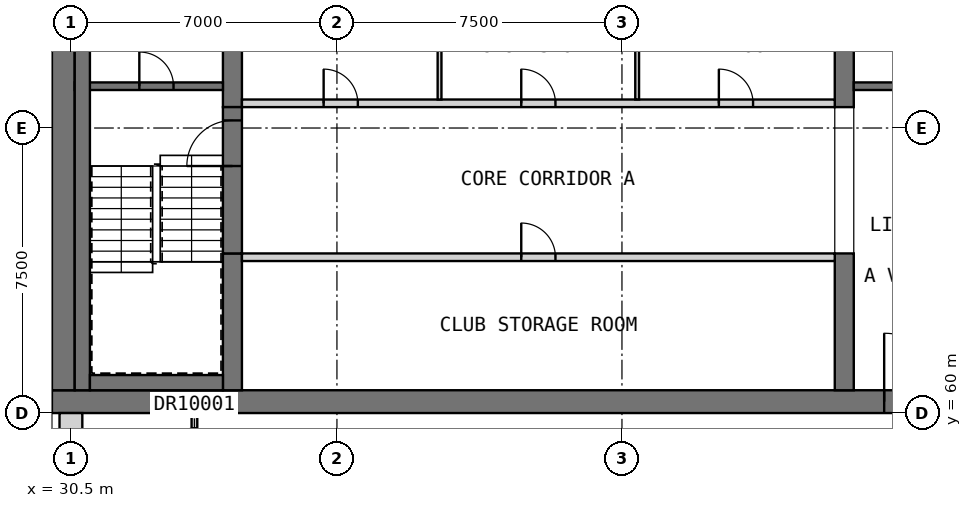
"""IFC4 building model, lengths in metres.
Left out: names, types, materials, properties, quantities, classifications, styles, units other than length and angle.
Written with IfcOpenShell. Run it as: python <this file> out.ifc"""

import sys

from ifc_helpers import new_model, si_unit, direction, frame, frame_2d, origin, place, context, subcontext, project, spatial, rectangle, extrude, element, fill, save


model = new_model("IFC4")
c1 = context("Model", 3, precision=1e-05, world=origin(), true_north=direction((0.0, 1.0)))
c2 = subcontext(c1, "Body", "Model", "MODEL_VIEW")
j1 = project(units=[si_unit("LENGTHUNIT", "METRE"), si_unit("PLANEANGLEUNIT", "RADIAN")], contexts=[c1])
p1 = place(None, origin())
s1 = spatial("IfcSite", under=j1, at=p1, CompositionType="ELEMENT")
p2 = place(p1, origin())
s2 = spatial("IfcBuilding", under=s1, at=p2, CompositionType="ELEMENT")
p3 = place(p2, frame((0.0, 0.0, 273.2)))
s3 = spatial("IfcBuildingStorey", under=s2, at=p3, CompositionType="ELEMENT", Elevation=273.2)
p4 = place(p3, frame((30.0, 60.3, 0.0), z_axis=(0.0, 0.0, 1.0), x_axis=(1.0, 0.0, 0.0)))
e1 = element("IfcWall", 1, at=p4, inside=s3, PredefinedType="SHEAR", context=c2, shape_type="SweptSolid", body=[
    extrude(rectangle(XDim=30.0, YDim=0.6, at=frame_2d((15.0, 0.0))), origin(), (0.0, 0.0, 1.0), 3.5),
])
p5 = place(p4, frame((21.9, 0.0, 0.0)))
e2 = element("IfcOpeningElement", 2, at=p5, cuts=e1, PredefinedType="OPENING", context=c2, shape_type="SweptSolid", body=[
    extrude(rectangle(XDim=1.8, YDim=2.1, at=frame_2d((0.9, 1.05))), frame((0.0, 0.31, 0.0), z_axis=(0.0, -1.0, 0.0), x_axis=(1.0, 0.0, 0.0)), (0.0, 0.0, 1.0), 0.62),
])
p6 = place(p4, frame((26.5, 0.0, 0.0)))
e3 = element("IfcOpeningElement", 3, at=p6, cuts=e1, PredefinedType="OPENING", context=c2, shape_type="SweptSolid", body=[
    extrude(rectangle(XDim=1.2, YDim=2.1, at=frame_2d((0.6, 1.05))), frame((0.0, 0.31, 0.0), z_axis=(0.0, -1.0, 0.0), x_axis=(1.0, 0.0, 0.0)), (0.0, 0.0, 1.0), 0.62),
])
p7 = place(p3, frame((30.3, 60.6, 0.0), z_axis=(0.0, 0.0, 1.0), x_axis=(0.0, 1.0, 0.0)))
e4 = element("IfcWall", 4, at=p7, inside=s3, PredefinedType="SHEAR", context=c2, shape_type="SweptSolid", body=[
    extrude(rectangle(XDim=21.3, YDim=0.6, at=frame_2d((10.65, 0.0))), origin(), (0.0, 0.0, 1.0), 3.5),
])
p8 = place(p3, frame((34.75, 60.6, 0.0), z_axis=(0.0, 0.0, 1.0), x_axis=(0.0, 1.0, 0.0)))
e5 = element("IfcWall", 5, at=p8, inside=s3, PredefinedType="SHEAR", context=c2, shape_type="SweptSolid", body=[
    extrude(rectangle(XDim=3.6, YDim=0.5, at=frame_2d((1.8, 0.0))), origin(), (0.0, 0.0, 1.0), 3.5),
])
p9 = place(p3, frame((34.75, 68.05, 0.0), z_axis=(0.0, 0.0, 1.0), x_axis=(0.0, 1.0, 0.0)))
e6 = element("IfcWall", 6, at=p9, inside=s3, PredefinedType="SHEAR", context=c2, shape_type="SweptSolid", body=[
    extrude(rectangle(XDim=6.4, YDim=0.5, at=frame_2d((3.2, 0.0))), origin(), (0.0, 0.0, 1.0), 3.5),
])
p10 = place(p3, frame((50.85, 60.6, 0.0), z_axis=(0.0, 0.0, 1.0), x_axis=(0.0, 1.0, 0.0)))
e7 = element("IfcWall", 7, at=p10, inside=s3, PredefinedType="SHEAR", context=c2, shape_type="SweptSolid", body=[
    extrude(rectangle(XDim=3.6, YDim=0.5, at=frame_2d((1.8, 0.0))), origin(), (0.0, 0.0, 1.0), 3.5),
])
p11 = place(p3, frame((50.85, 68.05, 0.0), z_axis=(0.0, 0.0, 1.0), x_axis=(0.0, 1.0, 0.0)))
e8 = element("IfcWall", 8, at=p11, inside=s3, PredefinedType="SHEAR", context=c2, shape_type="SweptSolid", body=[
    extrude(rectangle(XDim=6.4, YDim=0.5, at=frame_2d((3.2, 0.0))), origin(), (0.0, 0.0, 1.0), 3.5),
])
p12 = place(p3, frame((30.5, 60.0, 0.0), z_axis=(0.0, 0.0, 1.0), x_axis=(0.0, -1.0, 0.0)))
e9 = element("IfcWall", 9, at=p12, inside=s3, PredefinedType="SOLIDWALL", context=c2, shape_type="SweptSolid", body=[
    extrude(rectangle(XDim=7.0, YDim=0.6, at=frame_2d((3.5, 0.0))), origin(), (0.0, 0.0, 1.0), 3.25),
])
p13 = place(p12, frame((4.175, 0.0, 0.8)))
e10 = element("IfcOpeningElement", 10, at=p13, cuts=e9, PredefinedType="OPENING", context=c2, shape_type="SweptSolid", body=[
    extrude(rectangle(XDim=2.4, YDim=1.8, at=frame_2d((1.2, 0.9))), frame((0.0, 0.31, 0.0), z_axis=(0.0, -1.0, 0.0), x_axis=(1.0, 0.0, 0.0)), (0.0, 0.0, 1.0), 0.62),
])
p14 = place(p12, frame((0.675, 0.0, 0.8)))
e11 = element("IfcOpeningElement", 11, at=p14, cuts=e9, PredefinedType="OPENING", context=c2, shape_type="SweptSolid", body=[
    extrude(rectangle(XDim=2.4, YDim=1.8, at=frame_2d((1.2, 0.9))), frame((0.0, 0.31, 0.0), z_axis=(0.0, -1.0, 0.0), x_axis=(1.0, 0.0, 0.0)), (0.0, 0.0, 1.0), 0.62),
])
p15 = place(p3, frame((35.0, 64.1, 0.0), z_axis=(0.0, 0.0, 1.0), x_axis=(1.0, 0.0, 0.0)))
e12 = element("IfcWall", 12, at=p15, inside=s3, PredefinedType="PARTITIONING", context=c2, shape_type="SweptSolid", body=[
    extrude(rectangle(XDim=15.6, YDim=0.2, at=frame_2d((7.8, 0.0))), origin(), (0.0, 0.0, 1.0), 3.25),
])
p16 = place(p15, frame((7.35, 0.0, 0.0)))
e13 = element("IfcOpeningElement", 13, at=p16, cuts=e12, PredefinedType="OPENING", context=c2, shape_type="SweptSolid", body=[
    extrude(rectangle(XDim=0.9, YDim=2.1, at=frame_2d((0.45, 1.05))), frame((0.0, 0.11, 0.0), z_axis=(0.0, -1.0, 0.0), x_axis=(1.0, 0.0, 0.0)), (0.0, 0.0, 1.0), 0.22),
])
p17 = place(p3, frame((35.0, 68.15, 0.0), z_axis=(0.0, 0.0, 1.0), x_axis=(1.0, 0.0, 0.0)))
e14 = element("IfcWall", 14, at=p17, inside=s3, PredefinedType="PARTITIONING", context=c2, shape_type="SweptSolid", body=[
    extrude(rectangle(XDim=15.6, YDim=0.2, at=frame_2d((7.8, 0.0))), origin(), (0.0, 0.0, 1.0), 3.25),
])
p18 = place(p17, frame((2.15, 0.0, 0.0)))
e15 = element("IfcOpeningElement", 15, at=p18, cuts=e14, PredefinedType="OPENING", context=c2, shape_type="SweptSolid", body=[
    extrude(rectangle(XDim=0.9, YDim=2.1, at=frame_2d((0.45, 1.05))), frame((0.0, 0.11, 0.0), z_axis=(0.0, -1.0, 0.0), x_axis=(1.0, 0.0, 0.0)), (0.0, 0.0, 1.0), 0.22),
])
p19 = place(p17, frame((7.35, 0.0, 0.0)))
e16 = element("IfcOpeningElement", 16, at=p19, cuts=e14, PredefinedType="OPENING", context=c2, shape_type="SweptSolid", body=[
    extrude(rectangle(XDim=0.9, YDim=2.1, at=frame_2d((0.45, 1.05))), frame((0.0, 0.11, 0.0), z_axis=(0.0, -1.0, 0.0), x_axis=(1.0, 0.0, 0.0)), (0.0, 0.0, 1.0), 0.22),
])
p20 = place(p17, frame((12.55, 0.0, 0.0)))
e17 = element("IfcOpeningElement", 17, at=p20, cuts=e14, PredefinedType="OPENING", context=c2, shape_type="SweptSolid", body=[
    extrude(rectangle(XDim=0.9, YDim=2.1, at=frame_2d((0.45, 1.05))), frame((0.0, 0.11, 0.0), z_axis=(0.0, -1.0, 0.0), x_axis=(1.0, 0.0, 0.0)), (0.0, 0.0, 1.0), 0.22),
])
for number, where, z_axis, x_axis in (
    (18, (40.2, 68.25, 0.0), (0.0, 0.0, 1.0), (0.0, 1.0, 0.0)),
    (19, (45.4, 68.25, 0.0), (0.0, 0.0, 1.0), (0.0, 1.0, 0.0)),
):
    element("IfcWall", number, at=place(p3, frame(where, z_axis=z_axis, x_axis=x_axis)), inside=s3, PredefinedType="PARTITIONING", context=c2, shape_type="SweptSolid", body=[
        extrude(rectangle(XDim=2.75, YDim=0.1, at=frame_2d((1.375, 0.0))), origin(), (0.0, 0.0, 1.0), 3.25),
    ])
p21 = place(p3, frame((34.75, 64.2, 0.0), z_axis=(0.0, 0.0, 1.0), x_axis=(0.0, 1.0, 0.0)))
e20 = element("IfcWall", 20, at=p21, inside=s3, PredefinedType="SOLIDWALL", context=c2, shape_type="SweptSolid", body=[
    extrude(rectangle(XDim=3.85, YDim=0.5, at=frame_2d((1.925, 0.0))), origin(), (0.0, 0.0, 1.0), 2.3),
])
p22 = place(p21, frame((2.3, 0.0, 0.0)))
e21 = element("IfcOpeningElement", 21, at=p22, cuts=e20, PredefinedType="OPENING", context=c2, shape_type="SweptSolid", body=[
    extrude(rectangle(XDim=1.2, YDim=2.1, at=frame_2d((0.6, 1.05))), frame((0.0, 0.26, 0.0), z_axis=(0.0, -1.0, 0.0), x_axis=(1.0, 0.0, 0.0)), (0.0, 0.0, 1.0), 0.52),
])
p23 = place(p3, frame((30.6, 68.6, 0.0), z_axis=(0.0, 0.0, 1.0), x_axis=(1.0, 0.0, 0.0)))
e22 = element("IfcWall", 22, at=p23, inside=s3, PredefinedType="SOLIDWALL", context=c2, shape_type="SweptSolid", body=[
    extrude(rectangle(XDim=3.9, YDim=0.2, at=frame_2d((1.95, 0.0))), origin(), (0.0, 0.0, 1.0), 3.25),
])
p24 = place(p23, frame((1.7, 0.0, 0.0)))
e23 = element("IfcOpeningElement", 23, at=p24, cuts=e22, PredefinedType="OPENING", context=c2, shape_type="SweptSolid", body=[
    extrude(rectangle(XDim=0.9, YDim=2.1, at=frame_2d((0.45, 1.05))), frame((0.0, 0.11, 0.0), z_axis=(0.0, -1.0, 0.0), x_axis=(1.0, 0.0, 0.0)), (0.0, 0.0, 1.0), 0.22),
])
p25 = place(p3, frame((51.1, 68.6, 0.0), z_axis=(0.0, 0.0, 1.0), x_axis=(1.0, 0.0, 0.0)))
e24 = element("IfcWall", 24, at=p25, inside=s3, PredefinedType="SOLIDWALL", context=c2, shape_type="SweptSolid", body=[
    extrude(rectangle(XDim=8.3, YDim=0.2, at=frame_2d((4.15, 0.0))), origin(), (0.0, 0.0, 1.0), 3.25),
])
p26 = place(p3, frame((30.8, 60.6, 0.0), z_axis=(0.0, 0.0, 1.0), x_axis=(0.0, 1.0, 0.0)))
e25 = element("IfcWall", 25, at=p26, inside=s3, PredefinedType="SOLIDWALL", context=c2, shape_type="SweptSolid", body=[
    extrude(rectangle(XDim=21.3, YDim=0.4, at=frame_2d((10.65, 0.0))), origin(), (0.0, 0.0, 1.0), 3.25),
])
p27 = place(p3, frame((31.0, 60.8, 0.0), z_axis=(0.0, 0.0, 1.0), x_axis=(1.0, 0.0, 0.0)))
e26 = element("IfcWall", 26, at=p27, inside=s3, PredefinedType="SOLIDWALL", context=c2, shape_type="SweptSolid", body=[
    extrude(rectangle(XDim=3.5, YDim=0.4, at=frame_2d((1.75, 0.0))), origin(), (0.0, 0.0, 1.0), 3.25),
])
p28 = place(p3, frame((33.75, 58.275, 0.0), z_axis=(0.0, 0.0, 1.0), x_axis=(0.0, 1.0, 0.0)))
e27 = element("IfcWall", 27, at=p28, inside=s3, PredefinedType="PARTITIONING", context=c2, shape_type="SweptSolid", body=[
    extrude(rectangle(XDim=1.725, YDim=0.15, at=frame_2d((0.863, 0.0))), origin(), (0.0, 0.0, 1.0), 3.25),
])
p29 = place(p28, frame((0.325, 0.0, 0.0)))
e28 = element("IfcOpeningElement", 28, at=p29, cuts=e27, PredefinedType="OPENING", context=c2, shape_type="SweptSolid", body=[
    extrude(rectangle(XDim=1.0, YDim=2.1, at=frame_2d((0.5, 1.05))), frame((0.0, 0.085, 0.0), z_axis=(0.0, -1.0, 0.0), x_axis=(1.0, 0.0, 0.0)), (0.0, 0.0, 1.0), 0.17),
])
p30 = place(p16, origin())
e29 = element("IfcDoor", 29, at=p30, inside=s3, OperationType="SINGLE_SWING_RIGHT", PredefinedType="DOOR", context=c2, shape_type="SweptSolid", body=[
    extrude(rectangle(XDim=0.9, YDim=2.1, at=frame_2d((0.45, 1.05))), frame((0.0, 0.025, 0.0), z_axis=(0.0, -1.0, 0.0), x_axis=(1.0, 0.0, 0.0)), (0.0, 0.0, 1.0), 0.05),
])
fill(e13, e29)
p31 = place(p18, origin())
e30 = element("IfcDoor", 30, at=p31, inside=s3, OperationType="SINGLE_SWING_RIGHT", PredefinedType="DOOR", context=c2, shape_type="SweptSolid", body=[
    extrude(rectangle(XDim=0.9, YDim=2.1, at=frame_2d((0.45, 1.05))), frame((0.0, 0.025, 0.0), z_axis=(0.0, -1.0, 0.0), x_axis=(1.0, 0.0, 0.0)), (0.0, 0.0, 1.0), 0.05),
])
fill(e15, e30)
p32 = place(p19, origin())
e31 = element("IfcDoor", 31, at=p32, inside=s3, OperationType="SINGLE_SWING_LEFT", PredefinedType="DOOR", context=c2, shape_type="SweptSolid", body=[
    extrude(rectangle(XDim=0.9, YDim=2.1, at=frame_2d((0.45, 1.05))), frame((0.0, 0.025, 0.0), z_axis=(0.0, -1.0, 0.0), x_axis=(1.0, 0.0, 0.0)), (0.0, 0.0, 1.0), 0.05),
])
fill(e16, e31)
p33 = place(p20, origin())
e32 = element("IfcDoor", 32, at=p33, inside=s3, OperationType="SINGLE_SWING_RIGHT", PredefinedType="DOOR", context=c2, shape_type="SweptSolid", body=[
    extrude(rectangle(XDim=0.9, YDim=2.1, at=frame_2d((0.45, 1.05))), frame((0.0, 0.025, 0.0), z_axis=(0.0, -1.0, 0.0), x_axis=(1.0, 0.0, 0.0)), (0.0, 0.0, 1.0), 0.05),
])
fill(e17, e32)
p34 = place(p5, origin())
e33 = element("IfcDoor", 33, at=p34, inside=s3, OperationType="DOUBLE_DOOR_SINGLE_SWING", PredefinedType="DOOR", context=c2, shape_type="SweptSolid", body=[
    extrude(rectangle(XDim=1.8, YDim=2.1, at=frame_2d((0.9, 1.05))), frame((0.0, 0.025, 0.0), z_axis=(0.0, -1.0, 0.0), x_axis=(1.0, 0.0, 0.0)), (0.0, 0.0, 1.0), 0.05),
])
fill(e2, e33)
p35 = place(p22, origin())
e34 = element("IfcDoor", 34, at=p35, inside=s3, OperationType="SINGLE_SWING_LEFT", PredefinedType="DOOR", context=c2, shape_type="SweptSolid", body=[
    extrude(rectangle(XDim=1.2, YDim=2.1, at=frame_2d((0.6, 1.05))), frame((0.0, 0.025, 0.0), z_axis=(0.0, -1.0, 0.0), x_axis=(1.0, 0.0, 0.0)), (0.0, 0.0, 1.0), 0.05),
])
fill(e21, e34)
p36 = place(p24, origin())
e35 = element("IfcDoor", 35, at=p36, inside=s3, OperationType="SINGLE_SWING_LEFT", PredefinedType="DOOR", context=c2, shape_type="SweptSolid", body=[
    extrude(rectangle(XDim=0.9, YDim=2.1, at=frame_2d((0.45, 1.05))), frame((0.0, 0.025, 0.0), z_axis=(0.0, -1.0, 0.0), x_axis=(1.0, 0.0, 0.0)), (0.0, 0.0, 1.0), 0.05),
])
fill(e23, e35)
save(model, sys.argv[1])
